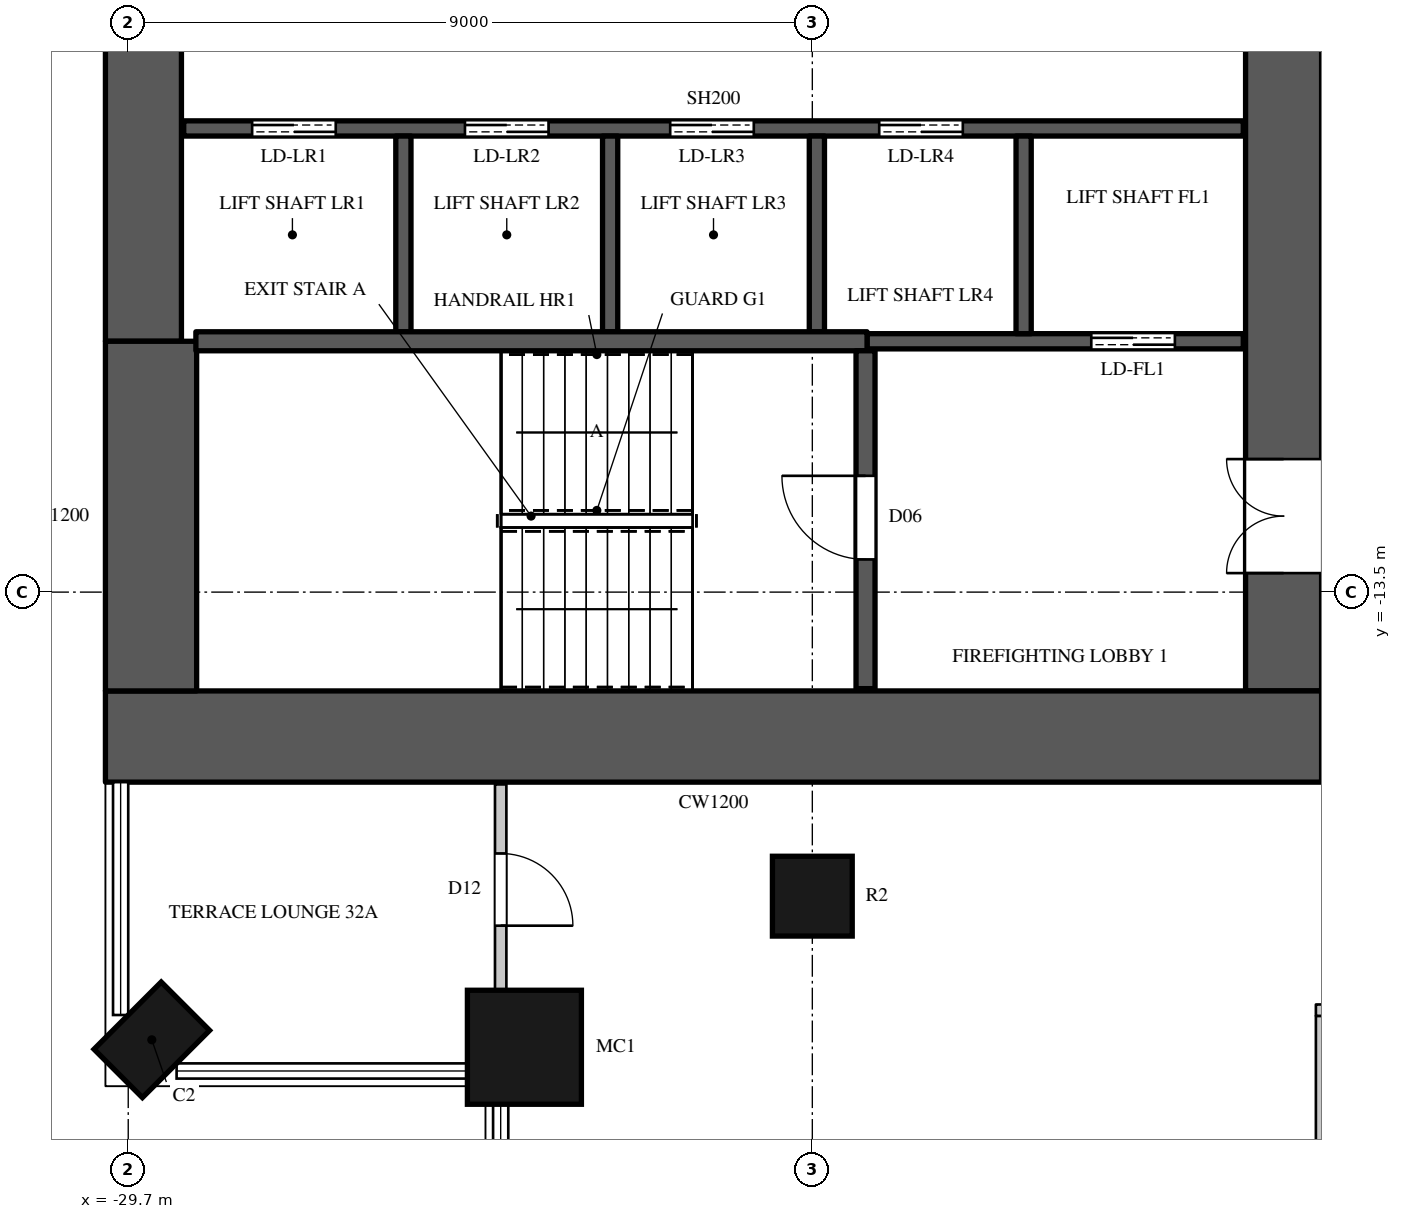
"""IFC4 building model, lengths in metres.
Left out: names, types, materials, properties, quantities, classifications, styles, units other than length and angle.
Written with IfcOpenShell. Run it as: python <this file> out.ifc"""

import sys

from ifc_helpers import new_model, si_unit, direction, frame, frame_2d, origin, origin_2d, place, context, subcontext, project, spatial, rectangle, circle, extrude, element, fill, save


model = new_model("IFC4")
c1 = context("Model", 3, precision=1e-05, world=origin(), true_north=direction((0.0, 1.0)))
c2 = subcontext(c1, "Body", "Model", "MODEL_VIEW")
j1 = project(units=[si_unit("LENGTHUNIT", "METRE"), si_unit("PLANEANGLEUNIT", "RADIAN")], contexts=[c1])
p1 = place(None, origin())
s1 = spatial("IfcSite", under=j1, at=p1, CompositionType="ELEMENT")
p2 = place(p1, origin())
s2 = spatial("IfcBuilding", under=s1, at=p2, CompositionType="ELEMENT")
p3 = place(p2, frame((0.0, 0.0, 145.5)))
s3 = spatial("IfcBuildingStorey", under=s2, at=p3, CompositionType="ELEMENT", Elevation=145.5)
p4 = place(p3, frame((-29.39, -19.39, 0.0), z_axis=(0.0, 0.0, 1.0), x_axis=(0.707106781187, -0.707106781187, 0.0)))
e1 = element("IfcColumn", 1, at=p4, inside=s3, PredefinedType="COLUMN", context=c2, shape_type="SweptSolid", body=[
    extrude(rectangle(XDim=0.9, YDim=1.25, at=origin_2d()), origin(), (0.0, 0.0, 1.0), 7.0),
])
p5 = place(p3, frame((-24.488, -19.488, 0.0), z_axis=(0.0, 0.0, 1.0), x_axis=(1.0, 0.0, 0.0)))
e2 = element("IfcColumn", 2, at=p5, inside=s3, PredefinedType="COLUMN", context=c2, shape_type="SweptSolid", body=[
    extrude(circle(Radius=0.75, at=origin_2d()), origin(), (0.0, 0.0, 1.0), 7.0),
])
p6 = place(p3, frame((-20.7, -17.5, 0.0), z_axis=(0.0, 0.0, 1.0), x_axis=(1.0, 0.0, 0.0)))
e3 = element("IfcColumn", 3, at=p6, inside=s3, PredefinedType="COLUMN", context=c2, shape_type="SweptSolid", body=[
    extrude(circle(Radius=0.525, at=origin_2d()), origin(), (0.0, 0.0, 1.0), 7.0),
])
p7 = place(p3, frame((-30.0, -15.4, 0.0), z_axis=(0.0, 0.0, 1.0), x_axis=(1.0, 0.0, 0.0)))
e4 = element("IfcWall", 4, at=p7, inside=s3, PredefinedType="SHEAR", context=c2, shape_type="SweptSolid", body=[
    extrude(rectangle(XDim=16.0, YDim=1.2, at=frame_2d((8.0, 0.0))), origin(), (0.0, 0.0, 1.0), 7.0),
])
p8 = place(p3, frame((-14.5, -14.8, 0.0), z_axis=(0.0, 0.0, 1.0), x_axis=(0.0, 1.0, 0.0)))
e5 = element("IfcWall", 5, at=p8, inside=s3, PredefinedType="SHEAR", context=c2, shape_type="SweptSolid", body=[
    extrude(rectangle(XDim=29.6, YDim=1.0, at=frame_2d((14.8, 0.0))), origin(), (0.0, 0.0, 1.0), 7.0),
])
p9 = place(p8, frame((1.55, 0.0, 0.0)))
e6 = element("IfcOpeningElement", 6, at=p9, cuts=e5, PredefinedType="OPENING", context=c2, shape_type="SweptSolid", body=[
    extrude(rectangle(XDim=1.5, YDim=2.4, at=frame_2d((0.75, 1.2))), frame((0.0, 0.51, 0.0), z_axis=(0.0, -1.0, 0.0), x_axis=(1.0, 0.0, 0.0)), (0.0, 0.0, 1.0), 1.02),
])
p10 = place(p8, frame((26.55, 0.0, 0.0)))
e7 = element("IfcOpeningElement", 7, at=p10, cuts=e5, PredefinedType="OPENING", context=c2, shape_type="SweptSolid", body=[
    extrude(rectangle(XDim=1.5, YDim=2.4, at=frame_2d((0.75, 1.2))), frame((0.0, 0.51, 0.0), z_axis=(0.0, -1.0, 0.0), x_axis=(1.0, 0.0, 0.0)), (0.0, 0.0, 1.0), 1.02),
])
p11 = place(p8, frame((8.45, 0.0, 0.0)))
e8 = element("IfcOpeningElement", 8, at=p11, cuts=e5, PredefinedType="OPENING", context=c2, shape_type="SweptSolid", body=[
    extrude(rectangle(XDim=1.5, YDim=2.4, at=frame_2d((0.75, 1.2))), frame((0.0, 0.51, 0.0), z_axis=(0.0, -1.0, 0.0), x_axis=(1.0, 0.0, 0.0)), (0.0, 0.0, 1.0), 1.02),
])
p12 = place(p8, frame((19.65, 0.0, 0.0)))
e9 = element("IfcOpeningElement", 9, at=p12, cuts=e5, PredefinedType="OPENING", context=c2, shape_type="SweptSolid", body=[
    extrude(rectangle(XDim=1.5, YDim=2.4, at=frame_2d((0.75, 1.2))), frame((0.0, 0.51, 0.0), z_axis=(0.0, -1.0, 0.0), x_axis=(1.0, 0.0, 0.0)), (0.0, 0.0, 1.0), 1.02),
])
p13 = place(p8, frame((14.5, 0.0, 0.0)))
e10 = element("IfcOpeningElement", 10, at=p13, cuts=e5, PredefinedType="OPENING", context=c2, shape_type="SweptSolid", body=[
    extrude(rectangle(XDim=0.6, YDim=2.0, at=frame_2d((0.3, 1.0))), frame((0.0, 0.51, 0.0), z_axis=(0.0, -1.0, 0.0), x_axis=(1.0, 0.0, 0.0)), (0.0, 0.0, 1.0), 1.02),
])
p14 = place(p3, frame((-29.5, -10.2, 0.0), z_axis=(0.0, 0.0, 1.0), x_axis=(0.0, 1.0, 0.0)))
e11 = element("IfcWall", 11, at=p14, inside=s3, PredefinedType="SHEAR", context=c2, shape_type="SweptSolid", body=[
    extrude(rectangle(XDim=20.4, YDim=1.0, at=frame_2d((10.2, 0.0))), origin(), (0.0, 0.0, 1.0), 7.0),
])
p15 = place(p3, frame((-29.4, -14.8, 0.0), z_axis=(0.0, 0.0, 1.0), x_axis=(0.0, 1.0, 0.0)))
e12 = element("IfcWall", 12, at=p15, inside=s3, PredefinedType="SHEAR", context=c2, shape_type="SweptSolid", body=[
    extrude(rectangle(XDim=4.6, YDim=1.2, at=frame_2d((2.3, 0.0))), origin(), (0.0, 0.0, 1.0), 7.0),
])
p16 = place(p3, frame((-24.8, -18.788, 0.0), z_axis=(0.0, 0.0, 1.0), x_axis=(0.0, 1.0, 0.0)))
e13 = element("IfcWall", 13, at=p16, inside=s3, PredefinedType="PARTITIONING", context=c2, shape_type="SweptSolid", body=[
    extrude(rectangle(XDim=2.758, YDim=0.15, at=frame_2d((1.379, 0.0))), origin(), (0.0, 0.0, 1.0), 6.7),
])
p17 = place(p16, frame((0.9, 0.0, 0.0)))
e14 = element("IfcOpeningElement", 14, at=p17, cuts=e13, PredefinedType="OPENING", context=c2, shape_type="SweptSolid", body=[
    extrude(rectangle(XDim=0.95, YDim=2.2, at=frame_2d((0.475, 1.1))), frame((0.0, 0.085, 0.0), z_axis=(0.0, -1.0, 0.0), x_axis=(1.0, 0.0, 0.0)), (0.0, 0.0, 1.0), 0.17),
])
p18 = place(p3, frame((-14.0, -25.755, 0.0), z_axis=(0.0, 0.0, 1.0), x_axis=(0.0, 1.0, 0.0)))
e15 = element("IfcWall", 15, at=p18, inside=s3, PredefinedType="PARTITIONING", context=c2, shape_type="SweptSolid", body=[
    extrude(rectangle(XDim=6.68, YDim=0.15, at=frame_2d((3.34, 0.0))), origin(), (0.0, 0.0, 1.0), 6.7),
])
p19 = place(p18, frame((2.9, 0.0, 0.0)))
e16 = element("IfcOpeningElement", 16, at=p19, cuts=e15, PredefinedType="OPENING", context=c2, shape_type="SweptSolid", body=[
    extrude(rectangle(XDim=0.9, YDim=2.2, at=frame_2d((0.45, 1.1))), frame((0.0, 0.085, 0.0), z_axis=(0.0, -1.0, 0.0), x_axis=(1.0, 0.0, 0.0)), (0.0, 0.0, 1.0), 0.17),
])
p20 = place(p3, frame((-14.075, -19.0, 0.0), z_axis=(0.0, 0.0, 1.0), x_axis=(1.0, 0.0, 0.0)))
e17 = element("IfcWall", 17, at=p20, inside=s3, PredefinedType="PARTITIONING", context=c2, shape_type="SweptSolid", body=[
    extrude(rectangle(XDim=12.15, YDim=0.15, at=frame_2d((6.075, 0.0))), origin(), (0.0, 0.0, 1.0), 6.7),
])
p21 = place(p3, frame((-28.97, -7.4, 0.0), z_axis=(0.0, 0.0, 1.0), x_axis=(1.0, 0.0, 0.0)))
e18 = element("IfcWall", 18, at=p21, inside=s3, PredefinedType="SHEAR", context=c2, shape_type="SweptSolid", body=[
    extrude(rectangle(XDim=13.94, YDim=0.2, at=frame_2d((6.97, 0.0))), origin(), (0.0, 0.0, 1.0), 6.7),
])
p22 = place(p21, frame((0.9, 0.0, 0.0)))
e19 = element("IfcOpeningElement", 19, at=p22, cuts=e18, PredefinedType="OPENING", context=c2, shape_type="SweptSolid", body=[
    extrude(rectangle(XDim=1.1, YDim=2.2, at=frame_2d((0.55, 1.1))), frame((0.0, 0.11, 0.0), z_axis=(0.0, -1.0, 0.0), x_axis=(1.0, 0.0, 0.0)), (0.0, 0.0, 1.0), 0.22),
])
p23 = place(p21, frame((3.7, 0.0, 0.0)))
e20 = element("IfcOpeningElement", 20, at=p23, cuts=e18, PredefinedType="OPENING", context=c2, shape_type="SweptSolid", body=[
    extrude(rectangle(XDim=1.1, YDim=2.2, at=frame_2d((0.55, 1.1))), frame((0.0, 0.11, 0.0), z_axis=(0.0, -1.0, 0.0), x_axis=(1.0, 0.0, 0.0)), (0.0, 0.0, 1.0), 0.22),
])
p24 = place(p21, frame((6.4, 0.0, 0.0)))
e21 = element("IfcOpeningElement", 21, at=p24, cuts=e18, PredefinedType="OPENING", context=c2, shape_type="SweptSolid", body=[
    extrude(rectangle(XDim=1.1, YDim=2.2, at=frame_2d((0.55, 1.1))), frame((0.0, 0.11, 0.0), z_axis=(0.0, -1.0, 0.0), x_axis=(1.0, 0.0, 0.0)), (0.0, 0.0, 1.0), 0.22),
])
p25 = place(p21, frame((9.15, 0.0, 0.0)))
e22 = element("IfcOpeningElement", 22, at=p25, cuts=e18, PredefinedType="OPENING", context=c2, shape_type="SweptSolid", body=[
    extrude(rectangle(XDim=1.1, YDim=2.2, at=frame_2d((0.55, 1.1))), frame((0.0, 0.11, 0.0), z_axis=(0.0, -1.0, 0.0), x_axis=(1.0, 0.0, 0.0)), (0.0, 0.0, 1.0), 0.22),
])
for number, where, z_axis, x_axis in (
    (23, (-26.08, -10.075, 0.0), (0.0, 0.0, 1.0), (0.0, 1.0, 0.0)),
    (24, (-23.36, -10.075, 0.0), (0.0, 0.0, 1.0), (0.0, 1.0, 0.0)),
    (25, (-20.64, -10.075, 0.0), (0.0, 0.0, 1.0), (0.0, 1.0, 0.0)),
):
    element("IfcWall", number, at=place(p3, frame(where, z_axis=z_axis, x_axis=x_axis)), inside=s3, PredefinedType="SHEAR", context=c2, shape_type="SweptSolid", body=[
        extrude(rectangle(XDim=2.575, YDim=0.2, at=frame_2d((1.288, 0.0))), origin(), (0.0, 0.0, 1.0), 6.7),
    ])
p26 = place(p3, frame((-19.98, -10.2, 0.0), z_axis=(0.0, 0.0, 1.0), x_axis=(1.0, 0.0, 0.0)))
e26 = element("IfcWall", 26, at=p26, inside=s3, PredefinedType="SHEAR", context=c2, shape_type="SweptSolid", body=[
    extrude(rectangle(XDim=4.95, YDim=0.2, at=frame_2d((2.475, 0.0))), origin(), (0.0, 0.0, 1.0), 6.7),
])
p27 = place(p26, frame((2.95, 0.0, 0.0)))
e27 = element("IfcOpeningElement", 27, at=p27, cuts=e26, PredefinedType="OPENING", context=c2, shape_type="SweptSolid", body=[
    extrude(rectangle(XDim=1.1, YDim=2.2, at=frame_2d((0.55, 1.1))), frame((0.0, 0.11, 0.0), z_axis=(0.0, -1.0, 0.0), x_axis=(1.0, 0.0, 0.0)), (0.0, 0.0, 1.0), 0.22),
])
p28 = place(p3, frame((-17.92, -10.1, 0.0), z_axis=(0.0, 0.0, 1.0), x_axis=(0.0, 1.0, 0.0)))
e28 = element("IfcWall", 28, at=p28, inside=s3, PredefinedType="SHEAR", context=c2, shape_type="SweptSolid", body=[
    extrude(rectangle(XDim=2.6, YDim=0.2, at=frame_2d((1.3, 0.0))), origin(), (0.0, 0.0, 1.0), 6.7),
])
p29 = place(p3, frame((-28.81, -10.2, 0.0), z_axis=(0.0, 0.0, 1.0), x_axis=(1.0, 0.0, 0.0)))
e29 = element("IfcWall", 29, at=p29, inside=s3, PredefinedType="SHEAR", context=c2, shape_type="SweptSolid", body=[
    extrude(rectangle(XDim=8.83, YDim=0.25, at=frame_2d((4.415, 0.0))), origin(), (0.0, 0.0, 1.0), 6.7),
])
p30 = place(p3, frame((-20.0, -14.77, 0.0), z_axis=(0.0, 0.0, 1.0), x_axis=(0.0, 1.0, 0.0)))
e30 = element("IfcWall", 30, at=p30, inside=s3, PredefinedType="SHEAR", context=c2, shape_type="SweptSolid", body=[
    extrude(rectangle(XDim=4.445, YDim=0.25, at=frame_2d((2.223, 0.0))), origin(), (0.0, 0.0, 1.0), 6.7),
])
p31 = place(p30, frame((1.7, 0.0, 0.0)))
e31 = element("IfcOpeningElement", 31, at=p31, cuts=e30, PredefinedType="OPENING", context=c2, shape_type="SweptSolid", body=[
    extrude(rectangle(XDim=1.1, YDim=2.2, at=frame_2d((0.55, 1.1))), frame((0.0, 0.135, 0.0), z_axis=(0.0, -1.0, 0.0), x_axis=(1.0, 0.0, 0.0)), (0.0, 0.0, 1.0), 0.27),
])
p32 = place(p31, origin())
e32 = element("IfcDoor", 32, at=p32, inside=s3, OperationType="SINGLE_SWING_RIGHT", PredefinedType="DOOR", context=c2, shape_type="SweptSolid", body=[
    extrude(rectangle(XDim=1.1, YDim=2.2, at=frame_2d((0.55, 1.1))), frame((0.0, 0.025, 0.0), z_axis=(0.0, -1.0, 0.0), x_axis=(1.0, 0.0, 0.0)), (0.0, 0.0, 1.0), 0.05),
])
fill(e31, e32)
p33 = place(p22, origin())
e33 = element("IfcDoor", 33, at=p33, inside=s3, OperationType="DOUBLE_DOOR_SLIDING", PredefinedType="DOOR", context=c2, shape_type="SweptSolid", body=[
    extrude(rectangle(XDim=1.1, YDim=2.2, at=frame_2d((0.55, 1.1))), frame((0.0, 0.025, 0.0), z_axis=(0.0, -1.0, 0.0), x_axis=(1.0, 0.0, 0.0)), (0.0, 0.0, 1.0), 0.05),
])
fill(e19, e33)
p34 = place(p23, origin())
e34 = element("IfcDoor", 34, at=p34, inside=s3, OperationType="DOUBLE_DOOR_SLIDING", PredefinedType="DOOR", context=c2, shape_type="SweptSolid", body=[
    extrude(rectangle(XDim=1.1, YDim=2.2, at=frame_2d((0.55, 1.1))), frame((0.0, 0.025, 0.0), z_axis=(0.0, -1.0, 0.0), x_axis=(1.0, 0.0, 0.0)), (0.0, 0.0, 1.0), 0.05),
])
fill(e20, e34)
p35 = place(p24, origin())
e35 = element("IfcDoor", 35, at=p35, inside=s3, OperationType="DOUBLE_DOOR_SLIDING", PredefinedType="DOOR", context=c2, shape_type="SweptSolid", body=[
    extrude(rectangle(XDim=1.1, YDim=2.2, at=frame_2d((0.55, 1.1))), frame((0.0, 0.025, 0.0), z_axis=(0.0, -1.0, 0.0), x_axis=(1.0, 0.0, 0.0)), (0.0, 0.0, 1.0), 0.05),
])
fill(e21, e35)
p36 = place(p25, origin())
e36 = element("IfcDoor", 36, at=p36, inside=s3, OperationType="DOUBLE_DOOR_SLIDING", PredefinedType="DOOR", context=c2, shape_type="SweptSolid", body=[
    extrude(rectangle(XDim=1.1, YDim=2.2, at=frame_2d((0.55, 1.1))), frame((0.0, 0.025, 0.0), z_axis=(0.0, -1.0, 0.0), x_axis=(1.0, 0.0, 0.0)), (0.0, 0.0, 1.0), 0.05),
])
fill(e22, e36)
p37 = place(p27, origin())
e37 = element("IfcDoor", 37, at=p37, inside=s3, OperationType="DOUBLE_DOOR_SLIDING", PredefinedType="DOOR", context=c2, shape_type="SweptSolid", body=[
    extrude(rectangle(XDim=1.1, YDim=2.2, at=frame_2d((0.55, 1.1))), frame((0.0, 0.025, 0.0), z_axis=(0.0, -1.0, 0.0), x_axis=(1.0, 0.0, 0.0)), (0.0, 0.0, 1.0), 0.05),
])
fill(e27, e37)
p38 = place(p17, origin())
e38 = element("IfcDoor", 38, at=p38, inside=s3, OperationType="SINGLE_SWING_RIGHT", PredefinedType="DOOR", context=c2, shape_type="SweptSolid", body=[
    extrude(rectangle(XDim=0.95, YDim=2.2, at=frame_2d((0.475, 1.1))), frame((0.0, 0.025, 0.0), z_axis=(0.0, -1.0, 0.0), x_axis=(1.0, 0.0, 0.0)), (0.0, 0.0, 1.0), 0.05),
])
fill(e14, e38)
p39 = place(p9, origin())
e39 = element("IfcDoor", 39, at=p39, inside=s3, OperationType="DOUBLE_DOOR_SINGLE_SWING", PredefinedType="DOOR", context=c2, shape_type="SweptSolid", body=[
    extrude(rectangle(XDim=1.5, YDim=2.4, at=frame_2d((0.75, 1.2))), frame((0.0, 0.495, 0.0), z_axis=(0.0, -1.0, 0.0), x_axis=(1.0, 0.0, 0.0)), (0.0, 0.0, 1.0), 0.05),
])
fill(e6, e39)
save(model, sys.argv[1])
